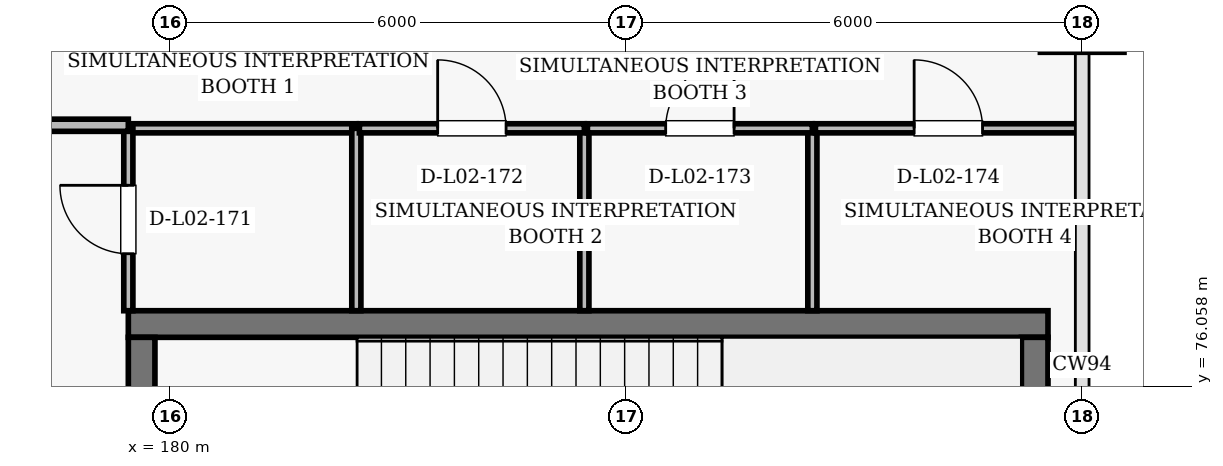
"""IFC4 building model, lengths in metres.
Left out: names, types, materials, properties, quantities, classifications, styles, units other than length and angle.
Written with IfcOpenShell. Run it as: python <this file> out.ifc"""

import sys

from ifc_helpers import new_model, si_unit, direction, frame, frame_2d, origin, place, context, subcontext, project, spatial, rectangle, extrude, element, fill, save


model = new_model("IFC4")
c1 = context("Model", 3, precision=1e-05, world=origin(), true_north=direction((0.0, 1.0)))
c2 = subcontext(c1, "Body", "Model", "MODEL_VIEW")
j1 = project(units=[si_unit("LENGTHUNIT", "METRE"), si_unit("PLANEANGLEUNIT", "RADIAN")], contexts=[c1])
p1 = place(None, origin())
s1 = spatial("IfcSite", under=j1, at=p1, CompositionType="ELEMENT")
p2 = place(p1, origin())
s2 = spatial("IfcBuilding", under=s1, at=p2, CompositionType="ELEMENT")
p3 = place(p2, frame((0.0, 0.0, 10.8)))
s3 = spatial("IfcBuildingStorey", under=s2, at=p3, CompositionType="ELEMENT", Elevation=10.8)
p4 = place(p3, frame((191.55, 76.875, 0.0), z_axis=(0.0, 0.0, 1.0), x_axis=(-1.0, 0.0, 0.0)))
e1 = element("IfcWall", 1, at=p4, inside=s3, PredefinedType="SHEAR", context=c2, shape_type="SweptSolid", body=[
    extrude(rectangle(XDim=12.1, YDim=0.35, at=frame_2d((6.05, 0.0))), origin(), (0.0, 0.0, 1.0), 4.6),
])
p5 = place(p3, frame((179.625, 76.7, 0.0), z_axis=(0.0, 0.0, 1.0), x_axis=(0.0, -1.0, 0.0)))
e2 = element("IfcWall", 2, at=p5, inside=s3, PredefinedType="SHEAR", context=c2, shape_type="SweptSolid", body=[
    extrude(rectangle(XDim=5.5, YDim=0.35, at=frame_2d((2.75, 0.0))), origin(), (0.0, 0.0, 1.0), 4.6),
])
p6 = place(p5, frame((1.85, 0.0, 0.0)))
e3 = element("IfcOpeningElement", 3, at=p6, cuts=e2, PredefinedType="OPENING", context=c2, shape_type="SweptSolid", body=[
    extrude(rectangle(XDim=1.8, YDim=2.2, at=frame_2d((0.9, 1.1))), frame((0.0, 0.185, 0.0), z_axis=(0.0, -1.0, 0.0), x_axis=(1.0, 0.0, 0.0)), (0.0, 0.0, 1.0), 0.37),
])
p7 = place(p3, frame((191.375, 71.2, 0.0), z_axis=(0.0, 0.0, 1.0), x_axis=(0.0, 1.0, 0.0)))
e4 = element("IfcWall", 4, at=p7, inside=s3, PredefinedType="SHEAR", context=c2, shape_type="SweptSolid", body=[
    extrude(rectangle(XDim=5.5, YDim=0.35, at=frame_2d((2.75, 0.0))), origin(), (0.0, 0.0, 1.0), 4.6),
])
p8 = place(p3, frame((179.45, 79.45, 0.0), z_axis=(0.0, 0.0, 1.0), x_axis=(1.0, 0.0, 0.0)))
e5 = element("IfcWall", 5, at=p8, inside=s3, PredefinedType="PARTITIONING", context=c2, shape_type="SweptSolid", body=[
    extrude(rectangle(XDim=3.0, YDim=0.12, at=frame_2d((1.5, 0.0))), origin(), (0.0, 0.0, 1.0), 3.89),
])
p9 = place(p3, frame((182.45, 79.45, 0.0), z_axis=(0.0, 0.0, 1.0), x_axis=(0.0, -1.0, 0.0)))
e6 = element("IfcWall", 6, at=p9, inside=s3, PredefinedType="PARTITIONING", context=c2, shape_type="SweptSolid", body=[
    extrude(rectangle(XDim=2.4, YDim=0.12, at=frame_2d((1.2, 0.0))), origin(), (0.0, 0.0, 1.0), 4.6),
])
p10 = place(p3, frame((179.45, 77.05, 0.0), z_axis=(0.0, 0.0, 1.0), x_axis=(0.0, 1.0, 0.0)))
e7 = element("IfcWall", 7, at=p10, inside=s3, PredefinedType="PARTITIONING", context=c2, shape_type="SweptSolid", body=[
    extrude(rectangle(XDim=2.4, YDim=0.12, at=frame_2d((1.2, 0.0))), origin(), (0.0, 0.0, 1.0), 4.178),
])
p11 = place(p10, frame((0.75, 0.0, 0.0)))
e8 = element("IfcOpeningElement", 8, at=p11, cuts=e7, PredefinedType="OPENING", context=c2, shape_type="SweptSolid", body=[
    extrude(rectangle(XDim=0.9, YDim=2.1, at=frame_2d((0.45, 1.05))), frame((0.0, 0.07, 0.0), z_axis=(0.0, -1.0, 0.0), x_axis=(1.0, 0.0, 0.0)), (0.0, 0.0, 1.0), 0.14),
])
p12 = place(p3, frame((185.45, 79.45, 0.0), z_axis=(0.0, 0.0, 1.0), x_axis=(0.0, -1.0, 0.0)))
e9 = element("IfcWall", 9, at=p12, inside=s3, PredefinedType="PARTITIONING", context=c2, shape_type="SweptSolid", body=[
    extrude(rectangle(XDim=2.4, YDim=0.12, at=frame_2d((1.2, 0.0))), origin(), (0.0, 0.0, 1.0), 4.6),
])
p13 = place(p3, frame((182.49, 79.45, 0.0), z_axis=(0.0, 0.0, 1.0), x_axis=(1.0, 0.0, 0.0)))
e10 = element("IfcWall", 10, at=p13, inside=s3, PredefinedType="PARTITIONING", context=c2, shape_type="SweptSolid", body=[
    extrude(rectangle(XDim=2.96, YDim=0.12, at=frame_2d((1.48, 0.0))), origin(), (0.0, 0.0, 1.0), 4.6),
])
p14 = place(p13, frame((1.03, 0.0, 0.0)))
e11 = element("IfcOpeningElement", 11, at=p14, cuts=e10, PredefinedType="OPENING", context=c2, shape_type="SweptSolid", body=[
    extrude(rectangle(XDim=0.9, YDim=2.1, at=frame_2d((0.45, 1.05))), frame((0.0, 0.07, 0.0), z_axis=(0.0, -1.0, 0.0), x_axis=(1.0, 0.0, 0.0)), (0.0, 0.0, 1.0), 0.14),
])
p15 = place(p3, frame((188.45, 79.45, 0.0), z_axis=(0.0, 0.0, 1.0), x_axis=(0.0, -1.0, 0.0)))
e12 = element("IfcWall", 12, at=p15, inside=s3, PredefinedType="PARTITIONING", context=c2, shape_type="SweptSolid", body=[
    extrude(rectangle(XDim=2.4, YDim=0.12, at=frame_2d((1.2, 0.0))), origin(), (0.0, 0.0, 1.0), 4.6),
])
p16 = place(p3, frame((185.49, 79.45, 0.0), z_axis=(0.0, 0.0, 1.0), x_axis=(1.0, 0.0, 0.0)))
e13 = element("IfcWall", 13, at=p16, inside=s3, PredefinedType="PARTITIONING", context=c2, shape_type="SweptSolid", body=[
    extrude(rectangle(XDim=2.96, YDim=0.12, at=frame_2d((1.48, 0.0))), origin(), (0.0, 0.0, 1.0), 4.6),
])
p17 = place(p16, frame((1.03, 0.0, 0.0)))
e14 = element("IfcOpeningElement", 14, at=p17, cuts=e13, PredefinedType="OPENING", context=c2, shape_type="SweptSolid", body=[
    extrude(rectangle(XDim=0.9, YDim=2.1, at=frame_2d((0.45, 1.05))), frame((0.0, 0.07, 0.0), z_axis=(0.0, -1.0, 0.0), x_axis=(1.0, 0.0, 0.0)), (0.0, 0.0, 1.0), 0.14),
])
p18 = place(p3, frame((188.49, 79.45, 0.0), z_axis=(0.0, 0.0, 1.0), x_axis=(1.0, 0.0, 0.0)))
e15 = element("IfcWall", 15, at=p18, inside=s3, PredefinedType="PARTITIONING", context=c2, shape_type="SweptSolid", body=[
    extrude(rectangle(XDim=3.498, YDim=0.12, at=frame_2d((1.749, 0.0))), origin(), (0.0, 0.0, 1.0), 4.119),
])
p19 = place(p18, frame((1.299, 0.0, 0.0)))
e16 = element("IfcOpeningElement", 16, at=p19, cuts=e15, PredefinedType="OPENING", context=c2, shape_type="SweptSolid", body=[
    extrude(rectangle(XDim=0.9, YDim=2.1, at=frame_2d((0.45, 1.05))), frame((0.0, 0.07, 0.0), z_axis=(0.0, -1.0, 0.0), x_axis=(1.0, 0.0, 0.0)), (0.0, 0.0, 1.0), 0.14),
])
p20 = place(p3, frame((179.45, 79.49, 0.0), z_axis=(0.0, 0.0, 1.0), x_axis=(-1.0, 0.0, 0.0)))
e17 = element("IfcWall", 17, at=p20, inside=s3, PredefinedType="PARTITIONING", context=c2, shape_type="SweptSolid", body=[
    extrude(rectangle(XDim=5.1, YDim=0.16, at=frame_2d((2.55, 0.0))), origin(), (0.0, 0.0, 1.0), 4.6),
])
p21 = place(p20, frame((1.425, 0.0, 0.0)))
e18 = element("IfcOpeningElement", 18, at=p21, cuts=e17, PredefinedType="OPENING", context=c2, shape_type="SweptSolid", body=[
    extrude(rectangle(XDim=2.25, YDim=2.4, at=frame_2d((1.125, 1.2))), frame((0.0, 0.09, 0.0), z_axis=(0.0, -1.0, 0.0), x_axis=(1.0, 0.0, 0.0)), (0.0, 0.0, 1.0), 0.18),
])
p22 = place(p11, origin())
e19 = element("IfcDoor", 19, at=p22, inside=s3, OperationType="SINGLE_SWING_RIGHT", PredefinedType="DOOR", context=c2, shape_type="SweptSolid", body=[
    extrude(rectangle(XDim=0.9, YDim=2.1, at=frame_2d((0.45, 1.05))), frame((0.0, 0.025, 0.0), z_axis=(0.0, -1.0, 0.0), x_axis=(1.0, 0.0, 0.0)), (0.0, 0.0, 1.0), 0.05),
])
fill(e8, e19)
p23 = place(p14, origin())
e20 = element("IfcDoor", 20, at=p23, inside=s3, OperationType="SINGLE_SWING_LEFT", PredefinedType="DOOR", context=c2, shape_type="SweptSolid", body=[
    extrude(rectangle(XDim=0.9, YDim=2.1, at=frame_2d((0.45, 1.05))), frame((0.0, 0.025, 0.0), z_axis=(0.0, -1.0, 0.0), x_axis=(1.0, 0.0, 0.0)), (0.0, 0.0, 1.0), 0.05),
])
fill(e11, e20)
p24 = place(p17, origin())
e21 = element("IfcDoor", 21, at=p24, inside=s3, OperationType="SINGLE_SWING_RIGHT", PredefinedType="DOOR", context=c2, shape_type="SweptSolid", body=[
    extrude(rectangle(XDim=0.9, YDim=2.1, at=frame_2d((0.45, 1.05))), frame((0.0, 0.025, 0.0), z_axis=(0.0, -1.0, 0.0), x_axis=(1.0, 0.0, 0.0)), (0.0, 0.0, 1.0), 0.05),
])
fill(e14, e21)
p25 = place(p19, origin())
e22 = element("IfcDoor", 22, at=p25, inside=s3, OperationType="SINGLE_SWING_LEFT", PredefinedType="DOOR", context=c2, shape_type="SweptSolid", body=[
    extrude(rectangle(XDim=0.9, YDim=2.1, at=frame_2d((0.45, 1.05))), frame((0.0, 0.025, 0.0), z_axis=(0.0, -1.0, 0.0), x_axis=(1.0, 0.0, 0.0)), (0.0, 0.0, 1.0), 0.05),
])
fill(e16, e22)
save(model, sys.argv[1])
